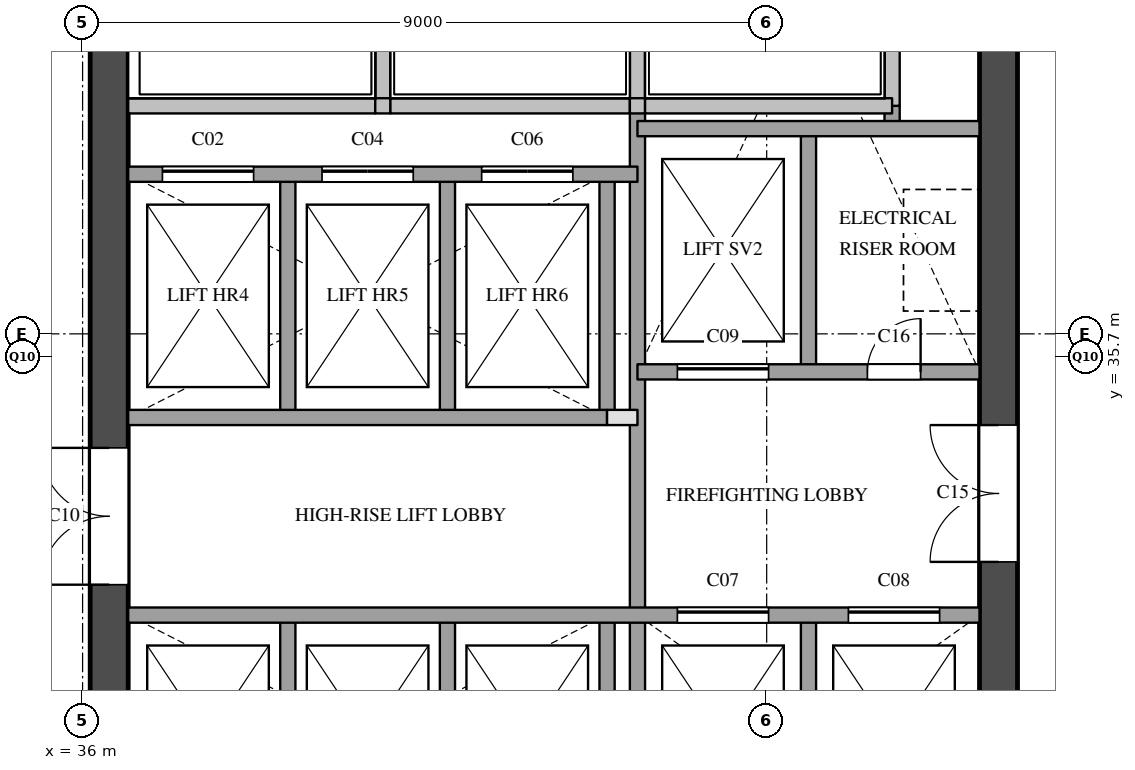
"""IFC4 building model, lengths in metres.
Left out: names, types, materials, properties, quantities, classifications, styles, units other than length and angle.
Written with IfcOpenShell. Run it as: python <this file> out.ifc"""

import sys

from ifc_helpers import new_model, si_unit, direction, frame, frame_2d, origin, place, context, subcontext, project, spatial, rectangle, extrude, element, fill, save


model = new_model("IFC4")
c1 = context("Model", 3, precision=1e-05, world=origin(), true_north=direction((0.0, 1.0)))
c2 = subcontext(c1, "Body", "Model", "MODEL_VIEW")
j1 = project(units=[si_unit("LENGTHUNIT", "METRE"), si_unit("PLANEANGLEUNIT", "RADIAN")], contexts=[c1])
p1 = place(None, origin())
s1 = spatial("IfcSite", under=j1, at=p1, CompositionType="ELEMENT")
p2 = place(p1, origin())
s2 = spatial("IfcBuilding", under=s1, at=p2, CompositionType="ELEMENT")
p3 = place(p2, frame((0.0, 0.0, 129.4)))
s3 = spatial("IfcBuildingStorey", under=s2, at=p3, CompositionType="ELEMENT", Elevation=129.4)
p4 = place(p3, frame((36.35, 29.1, 0.0), z_axis=(0.0, 0.0, 1.0), x_axis=(0.0, 1.0, 0.0)))
e1 = element("IfcWall", 1, at=p4, inside=s3, PredefinedType="SHEAR", context=c2, shape_type="SweptSolid", body=[
    extrude(rectangle(XDim=20.3, YDim=0.5, at=frame_2d((10.15, 0.0))), origin(), (0.0, 0.0, 1.0), 5.2),
])
p5 = place(p4, frame((3.6, 0.0, 0.0)))
e2 = element("IfcOpeningElement", 2, at=p5, cuts=e1, PredefinedType="OPENING", context=c2, shape_type="SweptSolid", body=[
    extrude(rectangle(XDim=1.8, YDim=2.1, at=frame_2d((0.9, 1.05))), frame((0.0, 0.26, 0.0), z_axis=(0.0, -1.0, 0.0), x_axis=(1.0, 0.0, 0.0)), (0.0, 0.0, 1.0), 0.52),
])
p6 = place(p4, frame((16.4, 0.0, 0.0)))
e3 = element("IfcOpeningElement", 3, at=p6, cuts=e1, PredefinedType="OPENING", context=c2, shape_type="SweptSolid", body=[
    extrude(rectangle(XDim=1.0, YDim=2.1, at=frame_2d((0.5, 1.05))), frame((0.0, 0.26, 0.0), z_axis=(0.0, -1.0, 0.0), x_axis=(1.0, 0.0, 0.0)), (0.0, 0.0, 1.0), 0.52),
])
p7 = place(p3, frame((48.05, 29.1, 0.0), z_axis=(0.0, 0.0, 1.0), x_axis=(0.0, 1.0, 0.0)))
e4 = element("IfcWall", 4, at=p7, inside=s3, PredefinedType="SHEAR", context=c2, shape_type="SweptSolid", body=[
    extrude(rectangle(XDim=20.3, YDim=0.5, at=frame_2d((10.15, 0.0))), origin(), (0.0, 0.0, 1.0), 5.2),
])
p8 = place(p7, frame((12.5, 0.0, 0.0)))
e5 = element("IfcOpeningElement", 5, at=p8, cuts=e4, PredefinedType="OPENING", context=c2, shape_type="SweptSolid", body=[
    extrude(rectangle(XDim=0.7, YDim=2.1, at=frame_2d((0.35, 1.05))), frame((0.0, 0.26, 0.0), z_axis=(0.0, -1.0, 0.0), x_axis=(1.0, 0.0, 0.0)), (0.0, 0.0, 1.0), 0.52),
])
p9 = place(p7, frame((3.9, 0.0, 0.0)))
e6 = element("IfcOpeningElement", 6, at=p9, cuts=e4, PredefinedType="OPENING", context=c2, shape_type="SweptSolid", body=[
    extrude(rectangle(XDim=1.8, YDim=2.1, at=frame_2d((0.9, 1.05))), frame((0.0, 0.26, 0.0), z_axis=(0.0, -1.0, 0.0), x_axis=(1.0, 0.0, 0.0)), (0.0, 0.0, 1.0), 0.52),
])
p10 = place(p3, frame((38.7, 29.1, 0.0), z_axis=(0.0, 0.0, 1.0), x_axis=(0.0, 1.0, 0.0)))
e7 = element("IfcWall", 7, at=p10, inside=s3, PredefinedType="SOLIDWALL", context=c2, shape_type="SweptSolid", body=[
    extrude(rectangle(XDim=3.2, YDim=0.2, at=frame_2d((1.6, 0.0))), origin(), (0.0, 0.0, 1.0), 5.2),
])
p11 = place(p3, frame((38.7, 34.9, 0.0), z_axis=(0.0, 0.0, 1.0), x_axis=(0.0, 1.0, 0.0)))
e8 = element("IfcWall", 8, at=p11, inside=s3, PredefinedType="SOLIDWALL", context=c2, shape_type="SweptSolid", body=[
    extrude(rectangle(XDim=3.2, YDim=0.2, at=frame_2d((1.6, 0.0))), origin(), (0.0, 0.0, 1.0), 5.2),
])
p12 = place(p3, frame((39.95, 39.0, 0.0), z_axis=(0.0, 0.0, 1.0), x_axis=(0.0, 1.0, 0.0)))
e9 = element("IfcWall", 9, at=p12, inside=s3, PredefinedType="SOLIDWALL", context=c2, shape_type="SweptSolid", body=[
    extrude(rectangle(XDim=2.06, YDim=0.2, at=frame_2d((1.03, 0.0))), origin(), (0.0, 0.0, 1.0), 5.2),
])
p13 = place(p3, frame((40.8, 29.1, 0.0), z_axis=(0.0, 0.0, 1.0), x_axis=(0.0, 1.0, 0.0)))
e10 = element("IfcWall", 10, at=p13, inside=s3, PredefinedType="SOLIDWALL", context=c2, shape_type="SweptSolid", body=[
    extrude(rectangle(XDim=3.2, YDim=0.2, at=frame_2d((1.6, 0.0))), origin(), (0.0, 0.0, 1.0), 5.2),
])
p14 = place(p3, frame((40.8, 34.9, 0.0), z_axis=(0.0, 0.0, 1.0), x_axis=(0.0, 1.0, 0.0)))
e11 = element("IfcWall", 11, at=p14, inside=s3, PredefinedType="SOLIDWALL", context=c2, shape_type="SweptSolid", body=[
    extrude(rectangle(XDim=3.2, YDim=0.2, at=frame_2d((1.6, 0.0))), origin(), (0.0, 0.0, 1.0), 5.2),
])
p15 = place(p3, frame((42.9, 29.1, 0.0), z_axis=(0.0, 0.0, 1.0), x_axis=(0.0, 1.0, 0.0)))
e12 = element("IfcWall", 12, at=p15, inside=s3, PredefinedType="SOLIDWALL", context=c2, shape_type="SweptSolid", body=[
    extrude(rectangle(XDim=3.2, YDim=0.2, at=frame_2d((1.6, 0.0))), origin(), (0.0, 0.0, 1.0), 5.2),
])
p16 = place(p3, frame((42.9, 34.9, 0.0), z_axis=(0.0, 0.0, 1.0), x_axis=(0.0, 1.0, 0.0)))
e13 = element("IfcWall", 13, at=p16, inside=s3, PredefinedType="SOLIDWALL", context=c2, shape_type="SweptSolid", body=[
    extrude(rectangle(XDim=3.2, YDim=0.2, at=frame_2d((1.6, 0.0))), origin(), (0.0, 0.0, 1.0), 5.2),
])
p17 = place(p3, frame((43.3, 29.1, 0.0), z_axis=(0.0, 0.0, 1.0), x_axis=(0.0, 1.0, 0.0)))
e14 = element("IfcWall", 14, at=p17, inside=s3, PredefinedType="SOLIDWALL", context=c2, shape_type="SweptSolid", body=[
    extrude(rectangle(XDim=9.9, YDim=0.2, at=frame_2d((4.95, 0.0))), origin(), (0.0, 0.0, 1.0), 5.2),
])
p18 = place(p3, frame((43.3, 39.0, 0.0), z_axis=(0.0, 0.0, 1.0), x_axis=(0.0, 1.0, 0.0)))
e15 = element("IfcWall", 15, at=p18, inside=s3, PredefinedType="SOLIDWALL", context=c2, shape_type="SweptSolid", body=[
    extrude(rectangle(XDim=2.06, YDim=0.2, at=frame_2d((1.03, 0.0))), origin(), (0.0, 0.0, 1.0), 5.2),
])
for number, where, z_axis, x_axis in (
    (16, (45.55, 29.1, 0.0), (0.0, 0.0, 1.0), (0.0, 1.0, 0.0)),
    (17, (45.55, 35.5, 0.0), (0.0, 0.0, 1.0), (0.0, 1.0, 0.0)),
):
    element("IfcWall", number, at=place(p3, frame(where, z_axis=z_axis, x_axis=x_axis)), inside=s3, PredefinedType="SOLIDWALL", context=c2, shape_type="SweptSolid", body=[
        extrude(rectangle(XDim=3.2, YDim=0.2, at=frame_2d((1.6, 0.0))), origin(), (0.0, 0.0, 1.0), 5.2),
    ])
p19 = place(p3, frame((46.65, 38.7, 0.0), z_axis=(0.0, 0.0, 1.0), x_axis=(0.0, 1.0, 0.0)))
e18 = element("IfcWall", 18, at=p19, inside=s3, PredefinedType="SOLIDWALL", context=c2, shape_type="SweptSolid", body=[
    extrude(rectangle(XDim=0.3, YDim=0.2, at=frame_2d((0.15, 0.0))), origin(), (0.0, 0.0, 1.0), 5.2),
])
p20 = place(p3, frame((46.65, 39.0, 0.0), z_axis=(0.0, 0.0, 1.0), x_axis=(0.0, 1.0, 0.0)))
e19 = element("IfcWall", 19, at=p20, inside=s3, PredefinedType="SOLIDWALL", context=c2, shape_type="SweptSolid", body=[
    extrude(rectangle(XDim=2.06, YDim=0.2, at=frame_2d((1.03, 0.0))), origin(), (0.0, 0.0, 1.0), 5.2),
])
p21 = place(p3, frame((36.6, 32.3, 0.0), z_axis=(0.0, 0.0, 1.0), x_axis=(1.0, 0.0, 0.0)))
e20 = element("IfcWall", 20, at=p21, inside=s3, PredefinedType="SOLIDWALL", context=c2, shape_type="SweptSolid", body=[
    extrude(rectangle(XDim=11.2, YDim=0.2, at=frame_2d((5.6, 0.0))), origin(), (0.0, 0.0, 1.0), 5.2),
])
p22 = place(p21, frame((7.225, 0.0, 0.0)))
e21 = element("IfcOpeningElement", 21, at=p22, cuts=e20, PredefinedType="OPENING", context=c2, shape_type="SweptSolid", body=[
    extrude(rectangle(XDim=1.2, YDim=2.1, at=frame_2d((0.6, 1.05))), frame((0.0, 0.11, 0.0), z_axis=(0.0, -1.0, 0.0), x_axis=(1.0, 0.0, 0.0)), (0.0, 0.0, 1.0), 0.22),
])
p23 = place(p21, frame((9.475, 0.0, 0.0)))
e22 = element("IfcOpeningElement", 22, at=p23, cuts=e20, PredefinedType="OPENING", context=c2, shape_type="SweptSolid", body=[
    extrude(rectangle(XDim=1.2, YDim=2.1, at=frame_2d((0.6, 1.05))), frame((0.0, 0.11, 0.0), z_axis=(0.0, -1.0, 0.0), x_axis=(1.0, 0.0, 0.0)), (0.0, 0.0, 1.0), 0.22),
])
p24 = place(p3, frame((42.9, 34.9, 0.0), z_axis=(0.0, 0.0, 1.0), x_axis=(1.0, 0.0, 0.0)))
e23 = element("IfcWall", 23, at=p24, inside=s3, PredefinedType="PARTITIONING", context=c2, shape_type="SweptSolid", body=[
    extrude(rectangle(XDim=0.4, YDim=0.2, at=frame_2d((0.2, 0.0))), origin(), (0.0, 0.0, 1.0), 5.2),
])
p25 = place(p3, frame((36.6, 34.9, 0.0), z_axis=(0.0, 0.0, 1.0), x_axis=(1.0, 0.0, 0.0)))
e24 = element("IfcWall", 24, at=p25, inside=s3, PredefinedType="SOLIDWALL", context=c2, shape_type="SweptSolid", body=[
    extrude(rectangle(XDim=6.3, YDim=0.2, at=frame_2d((3.15, 0.0))), origin(), (0.0, 0.0, 1.0), 5.2),
])
p26 = place(p3, frame((43.3, 35.5, 0.0), z_axis=(0.0, 0.0, 1.0), x_axis=(1.0, 0.0, 0.0)))
e25 = element("IfcWall", 25, at=p26, inside=s3, PredefinedType="SOLIDWALL", context=c2, shape_type="SweptSolid", body=[
    extrude(rectangle(XDim=4.5, YDim=0.2, at=frame_2d((2.25, 0.0))), origin(), (0.0, 0.0, 1.0), 5.2),
])
p27 = place(p26, frame((0.525, 0.0, 0.0)))
e26 = element("IfcOpeningElement", 26, at=p27, cuts=e25, PredefinedType="OPENING", context=c2, shape_type="SweptSolid", body=[
    extrude(rectangle(XDim=1.2, YDim=2.1, at=frame_2d((0.6, 1.05))), frame((0.0, 0.11, 0.0), z_axis=(0.0, -1.0, 0.0), x_axis=(1.0, 0.0, 0.0)), (0.0, 0.0, 1.0), 0.22),
])
p28 = place(p26, frame((3.025, 0.0, 0.0)))
e27 = element("IfcOpeningElement", 27, at=p28, cuts=e25, PredefinedType="OPENING", context=c2, shape_type="SweptSolid", body=[
    extrude(rectangle(XDim=0.7, YDim=2.1, at=frame_2d((0.35, 1.05))), frame((0.0, 0.11, 0.0), z_axis=(0.0, -1.0, 0.0), x_axis=(1.0, 0.0, 0.0)), (0.0, 0.0, 1.0), 0.22),
])
p29 = place(p3, frame((36.6, 38.1, 0.0), z_axis=(0.0, 0.0, 1.0), x_axis=(1.0, 0.0, 0.0)))
e28 = element("IfcWall", 28, at=p29, inside=s3, PredefinedType="SOLIDWALL", context=c2, shape_type="SweptSolid", body=[
    extrude(rectangle(XDim=6.7, YDim=0.2, at=frame_2d((3.35, 0.0))), origin(), (0.0, 0.0, 1.0), 5.2),
])
p30 = place(p29, frame((0.45, 0.0, 0.0)))
e29 = element("IfcOpeningElement", 29, at=p30, cuts=e28, PredefinedType="OPENING", context=c2, shape_type="SweptSolid", body=[
    extrude(rectangle(XDim=1.2, YDim=2.1, at=frame_2d((0.6, 1.05))), frame((0.0, 0.11, 0.0), z_axis=(0.0, -1.0, 0.0), x_axis=(1.0, 0.0, 0.0)), (0.0, 0.0, 1.0), 0.22),
])
p31 = place(p29, frame((2.55, 0.0, 0.0)))
e30 = element("IfcOpeningElement", 30, at=p31, cuts=e28, PredefinedType="OPENING", context=c2, shape_type="SweptSolid", body=[
    extrude(rectangle(XDim=1.2, YDim=2.1, at=frame_2d((0.6, 1.05))), frame((0.0, 0.11, 0.0), z_axis=(0.0, -1.0, 0.0), x_axis=(1.0, 0.0, 0.0)), (0.0, 0.0, 1.0), 0.22),
])
p32 = place(p29, frame((4.65, 0.0, 0.0)))
e31 = element("IfcOpeningElement", 31, at=p32, cuts=e28, PredefinedType="OPENING", context=c2, shape_type="SweptSolid", body=[
    extrude(rectangle(XDim=1.2, YDim=2.1, at=frame_2d((0.6, 1.05))), frame((0.0, 0.11, 0.0), z_axis=(0.0, -1.0, 0.0), x_axis=(1.0, 0.0, 0.0)), (0.0, 0.0, 1.0), 0.22),
])
p33 = place(p3, frame((43.3, 38.7, 0.0), z_axis=(0.0, 0.0, 1.0), x_axis=(1.0, 0.0, 0.0)))
e32 = element("IfcWall", 32, at=p33, inside=s3, PredefinedType="SOLIDWALL", context=c2, shape_type="SweptSolid", body=[
    extrude(rectangle(XDim=4.5, YDim=0.2, at=frame_2d((2.25, 0.0))), origin(), (0.0, 0.0, 1.0), 5.2),
])
p34 = place(p3, frame((36.6, 39.0, 0.0), z_axis=(0.0, 0.0, 1.0), x_axis=(1.0, 0.0, 0.0)))
e33 = element("IfcWall", 33, at=p34, inside=s3, PredefinedType="SOLIDWALL", context=c2, shape_type="SweptSolid", body=[
    extrude(rectangle(XDim=3.25, YDim=0.2, at=frame_2d((1.625, 0.0))), origin(), (0.0, 0.0, 1.0), 5.2),
])
p35 = place(p3, frame((39.85, 39.0, 0.0), z_axis=(0.0, 0.0, 1.0), x_axis=(1.0, 0.0, 0.0)))
e34 = element("IfcWall", 34, at=p35, inside=s3, PredefinedType="SOLIDWALL", context=c2, shape_type="SweptSolid", body=[
    extrude(rectangle(XDim=0.2, YDim=0.2, at=frame_2d((0.1, 0.0))), origin(), (0.0, 0.0, 1.0), 5.2),
])
p36 = place(p3, frame((40.05, 39.0, 0.0), z_axis=(0.0, 0.0, 1.0), x_axis=(1.0, 0.0, 0.0)))
e35 = element("IfcWall", 35, at=p36, inside=s3, PredefinedType="SOLIDWALL", context=c2, shape_type="SweptSolid", body=[
    extrude(rectangle(XDim=3.15, YDim=0.2, at=frame_2d((1.575, 0.0))), origin(), (0.0, 0.0, 1.0), 5.2),
])
p37 = place(p3, frame((43.2, 39.0, 0.0), z_axis=(0.0, 0.0, 1.0), x_axis=(1.0, 0.0, 0.0)))
e36 = element("IfcWall", 36, at=p37, inside=s3, PredefinedType="SOLIDWALL", context=c2, shape_type="SweptSolid", body=[
    extrude(rectangle(XDim=0.2, YDim=0.2, at=frame_2d((0.1, 0.0))), origin(), (0.0, 0.0, 1.0), 5.2),
])
p38 = place(p3, frame((43.4, 39.0, 0.0), z_axis=(0.0, 0.0, 1.0), x_axis=(1.0, 0.0, 0.0)))
e37 = element("IfcWall", 37, at=p38, inside=s3, PredefinedType="SOLIDWALL", context=c2, shape_type="SweptSolid", body=[
    extrude(rectangle(XDim=3.25, YDim=0.2, at=frame_2d((1.625, 0.0))), origin(), (0.0, 0.0, 1.0), 5.2),
])
p39 = place(p30, origin())
e38 = element("IfcDoor", 38, at=p39, inside=s3, OperationType="SLIDING_TO_LEFT", PredefinedType="DOOR", context=c2, shape_type="SweptSolid", body=[
    extrude(rectangle(XDim=1.2, YDim=2.1, at=frame_2d((0.6, 1.05))), frame((0.0, 0.025, 0.0), z_axis=(0.0, -1.0, 0.0), x_axis=(1.0, 0.0, 0.0)), (0.0, 0.0, 1.0), 0.05),
])
fill(e29, e38)
p40 = place(p31, origin())
e39 = element("IfcDoor", 39, at=p40, inside=s3, OperationType="SLIDING_TO_LEFT", PredefinedType="DOOR", context=c2, shape_type="SweptSolid", body=[
    extrude(rectangle(XDim=1.2, YDim=2.1, at=frame_2d((0.6, 1.05))), frame((0.0, 0.025, 0.0), z_axis=(0.0, -1.0, 0.0), x_axis=(1.0, 0.0, 0.0)), (0.0, 0.0, 1.0), 0.05),
])
fill(e30, e39)
p41 = place(p32, origin())
e40 = element("IfcDoor", 40, at=p41, inside=s3, OperationType="SLIDING_TO_LEFT", PredefinedType="DOOR", context=c2, shape_type="SweptSolid", body=[
    extrude(rectangle(XDim=1.2, YDim=2.1, at=frame_2d((0.6, 1.05))), frame((0.0, 0.025, 0.0), z_axis=(0.0, -1.0, 0.0), x_axis=(1.0, 0.0, 0.0)), (0.0, 0.0, 1.0), 0.05),
])
fill(e31, e40)
p42 = place(p22, origin())
e41 = element("IfcDoor", 41, at=p42, inside=s3, OperationType="SLIDING_TO_LEFT", PredefinedType="DOOR", context=c2, shape_type="SweptSolid", body=[
    extrude(rectangle(XDim=1.2, YDim=2.1, at=frame_2d((0.6, 1.05))), frame((0.0, 0.025, 0.0), z_axis=(0.0, -1.0, 0.0), x_axis=(1.0, 0.0, 0.0)), (0.0, 0.0, 1.0), 0.05),
])
fill(e21, e41)
p43 = place(p23, origin())
e42 = element("IfcDoor", 42, at=p43, inside=s3, OperationType="SLIDING_TO_LEFT", PredefinedType="DOOR", context=c2, shape_type="SweptSolid", body=[
    extrude(rectangle(XDim=1.2, YDim=2.1, at=frame_2d((0.6, 1.05))), frame((0.0, 0.025, 0.0), z_axis=(0.0, -1.0, 0.0), x_axis=(1.0, 0.0, 0.0)), (0.0, 0.0, 1.0), 0.05),
])
fill(e22, e42)
p44 = place(p27, origin())
e43 = element("IfcDoor", 43, at=p44, inside=s3, OperationType="SLIDING_TO_LEFT", PredefinedType="DOOR", context=c2, shape_type="SweptSolid", body=[
    extrude(rectangle(XDim=1.2, YDim=2.1, at=frame_2d((0.6, 1.05))), frame((0.0, 0.025, 0.0), z_axis=(0.0, -1.0, 0.0), x_axis=(1.0, 0.0, 0.0)), (0.0, 0.0, 1.0), 0.05),
])
fill(e26, e43)
p45 = place(p5, origin())
e44 = element("IfcDoor", 44, at=p45, inside=s3, OperationType="DOUBLE_DOOR_SINGLE_SWING", PredefinedType="DOOR", context=c2, shape_type="SweptSolid", body=[
    extrude(rectangle(XDim=1.8, YDim=2.1, at=frame_2d((0.9, 1.05))), frame((0.0, 0.025, 0.0), z_axis=(0.0, -1.0, 0.0), x_axis=(1.0, 0.0, 0.0)), (0.0, 0.0, 1.0), 0.05),
])
fill(e2, e44)
p46 = place(p9, origin())
e45 = element("IfcDoor", 45, at=p46, inside=s3, OperationType="DOUBLE_DOOR_SINGLE_SWING", PredefinedType="DOOR", context=c2, shape_type="SweptSolid", body=[
    extrude(rectangle(XDim=1.8, YDim=2.1, at=frame_2d((0.9, 1.05))), frame((0.0, 0.025, 0.0), z_axis=(0.0, -1.0, 0.0), x_axis=(1.0, 0.0, 0.0)), (0.0, 0.0, 1.0), 0.05),
])
fill(e6, e45)
p47 = place(p28, origin())
e46 = element("IfcDoor", 46, at=p47, inside=s3, OperationType="SINGLE_SWING_RIGHT", PredefinedType="DOOR", context=c2, shape_type="SweptSolid", body=[
    extrude(rectangle(XDim=0.7, YDim=2.1, at=frame_2d((0.35, 1.05))), frame((0.0, 0.025, 0.0), z_axis=(0.0, -1.0, 0.0), x_axis=(1.0, 0.0, 0.0)), (0.0, 0.0, 1.0), 0.05),
])
fill(e27, e46)
save(model, sys.argv[1])
